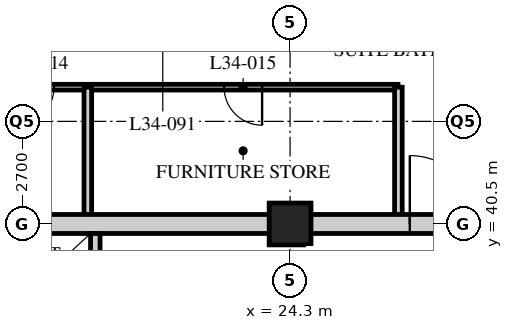
"""IFC4 building model, lengths in metres.
Left out: names, types, materials, properties, quantities, classifications, styles, units other than length and angle.
Written with IfcOpenShell. Run it as: python <this file> out.ifc"""

import sys

from ifc_helpers import new_model, si_unit, direction, frame, frame_2d, origin, origin_2d, place, context, subcontext, project, spatial, rectangle, hollow_rectangle, extrude, element, fill, save


model = new_model("IFC4")
c1 = context("Model", 3, precision=1e-05, world=origin(), true_north=direction((0.0, 1.0)))
c2 = subcontext(c1, "Body", "Model", "MODEL_VIEW")
j1 = project(units=[si_unit("LENGTHUNIT", "METRE"), si_unit("PLANEANGLEUNIT", "RADIAN")], contexts=[c1])
p1 = place(None, origin())
s1 = spatial("IfcSite", under=j1, at=p1, CompositionType="ELEMENT")
p2 = place(p1, origin())
s2 = spatial("IfcBuilding", under=s1, at=p2, CompositionType="ELEMENT")
p3 = place(p2, frame((0.0, 0.0, 134.0)))
s3 = spatial("IfcBuildingStorey", under=s2, at=p3, CompositionType="ELEMENT", Elevation=134.0)
p4 = place(p3, frame((24.3, 40.5, 0.0), z_axis=(0.0, 0.0, 1.0), x_axis=(1.0, 0.0, 0.0)))
e1 = element("IfcColumn", 1, at=p4, inside=s3, PredefinedType="COLUMN", context=c2, shape_type="SweptSolid", body=[
    extrude(hollow_rectangle(XDim=1.1, YDim=1.1, WallThickness=0.1, at=origin_2d()), origin(), (0.0, 0.0, 1.0), 3.4),
])
p5 = place(p3, frame((27.14, 44.1, 0.0), z_axis=(0.0, 0.0, 1.0), x_axis=(-1.0, 0.0, 0.0)))
e2 = element("IfcWall", 2, at=p5, inside=s3, PredefinedType="PARTITIONING", context=c2, shape_type="SweptSolid", body=[
    extrude(rectangle(XDim=17.24, YDim=0.15, at=frame_2d((8.62, 0.0))), origin(), (0.0, 0.0, 1.0), 3.19),
])
p6 = place(p5, frame((13.59, 0.0, 0.0)))
e3 = element("IfcOpeningElement", 3, at=p6, cuts=e2, PredefinedType="OPENING", context=c2, shape_type="SweptSolid", body=[
    extrude(rectangle(XDim=1.0, YDim=2.1, at=frame_2d((0.5, 1.05))), frame((0.0, 0.085, 0.0), z_axis=(0.0, -1.0, 0.0), x_axis=(1.0, 0.0, 0.0)), (0.0, 0.0, 1.0), 0.17),
])
p7 = place(p5, frame((9.051, 0.0, 0.0)))
e4 = element("IfcOpeningElement", 4, at=p7, cuts=e2, PredefinedType="OPENING", context=c2, shape_type="SweptSolid", body=[
    extrude(rectangle(XDim=1.0, YDim=2.1, at=frame_2d((0.5, 1.05))), frame((0.0, 0.085, 0.0), z_axis=(0.0, -1.0, 0.0), x_axis=(1.0, 0.0, 0.0)), (0.0, 0.0, 1.0), 0.17),
])
p8 = place(p5, frame((3.576, 0.0, 0.0)))
e5 = element("IfcOpeningElement", 5, at=p8, cuts=e2, PredefinedType="OPENING", context=c2, shape_type="SweptSolid", body=[
    extrude(rectangle(XDim=1.0, YDim=2.1, at=frame_2d((0.5, 1.05))), frame((0.0, 0.085, 0.0), z_axis=(0.0, -1.0, 0.0), x_axis=(1.0, 0.0, 0.0)), (0.0, 0.0, 1.0), 0.17),
])
for number, where, z_axis, x_axis in (
    (6, (18.978, 44.1, 0.0), (0.0, 0.0, 1.0), (0.0, -1.0, 0.0)),
    (7, (27.15, 40.5, 0.0), (0.0, 0.0, 1.0), (0.0, 1.0, 0.0)),
):
    element("IfcWall", number, at=place(p3, frame(where, z_axis=z_axis, x_axis=x_axis)), inside=s3, PredefinedType="SOLIDWALL", context=c2, shape_type="SweptSolid", body=[
        extrude(rectangle(XDim=3.6, YDim=0.2, at=frame_2d((1.8, 0.0))), origin(), (0.0, 0.0, 1.0), 3.19),
    ])
p9 = place(p3, frame((15.95, 40.5, 0.0), z_axis=(0.0, 0.0, 1.0), x_axis=(1.0, 0.0, 0.0)))
e8 = element("IfcWall", 8, at=p9, inside=s3, PredefinedType="SOLIDWALL", context=c2, shape_type="SweptSolid", body=[
    extrude(rectangle(XDim=24.8, YDim=0.5, at=frame_2d((12.4, 0.0))), origin(), (0.0, 0.0, 1.0), 2.54),
])
p10 = place(p9, frame((11.5, 0.0, 0.0)))
e9 = element("IfcOpeningElement", 9, at=p10, cuts=e8, PredefinedType="OPENING", context=c2, shape_type="SweptSolid", body=[
    extrude(rectangle(XDim=1.8, YDim=2.4, at=frame_2d((0.9, 1.2))), frame((0.0, 0.26, 0.0), z_axis=(0.0, -1.0, 0.0), x_axis=(1.0, 0.0, 0.0)), (0.0, 0.0, 1.0), 0.52),
])
p11 = place(p3, frame((19.175, 32.5, 0.0), z_axis=(0.0, 0.0, 1.0), x_axis=(0.0, 1.0, 0.0)))
e10 = element("IfcWall", 10, at=p11, inside=s3, PredefinedType="SOLIDWALL", context=c2, shape_type="SweptSolid", body=[
    extrude(rectangle(XDim=7.75, YDim=0.25, at=frame_2d((3.875, 0.0))), origin(), (0.0, 0.0, 1.0), 3.19),
])
p12 = place(p11, frame((0.8, 0.0, 0.0)))
e11 = element("IfcOpeningElement", 11, at=p12, cuts=e10, PredefinedType="OPENING", context=c2, shape_type="SweptSolid", body=[
    extrude(rectangle(XDim=1.1, YDim=2.4, at=frame_2d((0.55, 1.2))), frame((0.0, 0.135, 0.0), z_axis=(0.0, -1.0, 0.0), x_axis=(1.0, 0.0, 0.0)), (0.0, 0.0, 1.0), 0.27),
])
p13 = place(p11, frame((3.4, 0.0, 0.0)))
e12 = element("IfcOpeningElement", 12, at=p13, cuts=e10, PredefinedType="OPENING", context=c2, shape_type="SweptSolid", body=[
    extrude(rectangle(XDim=1.1, YDim=2.4, at=frame_2d((0.55, 1.2))), frame((0.0, 0.135, 0.0), z_axis=(0.0, -1.0, 0.0), x_axis=(1.0, 0.0, 0.0)), (0.0, 0.0, 1.0), 0.27),
])
p14 = place(p11, frame((6.0, 0.0, 0.0)))
e13 = element("IfcOpeningElement", 13, at=p14, cuts=e10, PredefinedType="OPENING", context=c2, shape_type="SweptSolid", body=[
    extrude(rectangle(XDim=1.1, YDim=2.4, at=frame_2d((0.55, 1.2))), frame((0.0, 0.135, 0.0), z_axis=(0.0, -1.0, 0.0), x_axis=(1.0, 0.0, 0.0)), (0.0, 0.0, 1.0), 0.27),
])
p15 = place(p7, origin())
e14 = element("IfcDoor", 14, at=p15, inside=s3, OperationType="SINGLE_SWING_RIGHT", PredefinedType="DOOR", context=c2, shape_type="SweptSolid", body=[
    extrude(rectangle(XDim=1.0, YDim=2.1, at=frame_2d((0.5, 1.05))), frame((0.0, 0.025, 0.0), z_axis=(0.0, -1.0, 0.0), x_axis=(1.0, 0.0, 0.0)), (0.0, 0.0, 1.0), 0.05),
])
fill(e4, e14)
p16 = place(p8, origin())
e15 = element("IfcDoor", 15, at=p16, inside=s3, OperationType="SINGLE_SWING_LEFT", PredefinedType="DOOR", context=c2, shape_type="SweptSolid", body=[
    extrude(rectangle(XDim=1.0, YDim=2.1, at=frame_2d((0.5, 1.05))), frame((0.0, 0.025, 0.0), z_axis=(0.0, -1.0, 0.0), x_axis=(1.0, 0.0, 0.0)), (0.0, 0.0, 1.0), 0.05),
])
fill(e5, e15)
p17 = place(p10, origin())
e16 = element("IfcDoor", 16, at=p17, inside=s3, OperationType="DOUBLE_DOOR_SINGLE_SWING", PredefinedType="DOOR", context=c2, shape_type="SweptSolid", body=[
    extrude(rectangle(XDim=1.8, YDim=2.4, at=frame_2d((0.9, 1.2))), frame((0.0, 0.025, 0.0), z_axis=(0.0, -1.0, 0.0), x_axis=(1.0, 0.0, 0.0)), (0.0, 0.0, 1.0), 0.05),
])
fill(e9, e16)
save(model, sys.argv[1])
